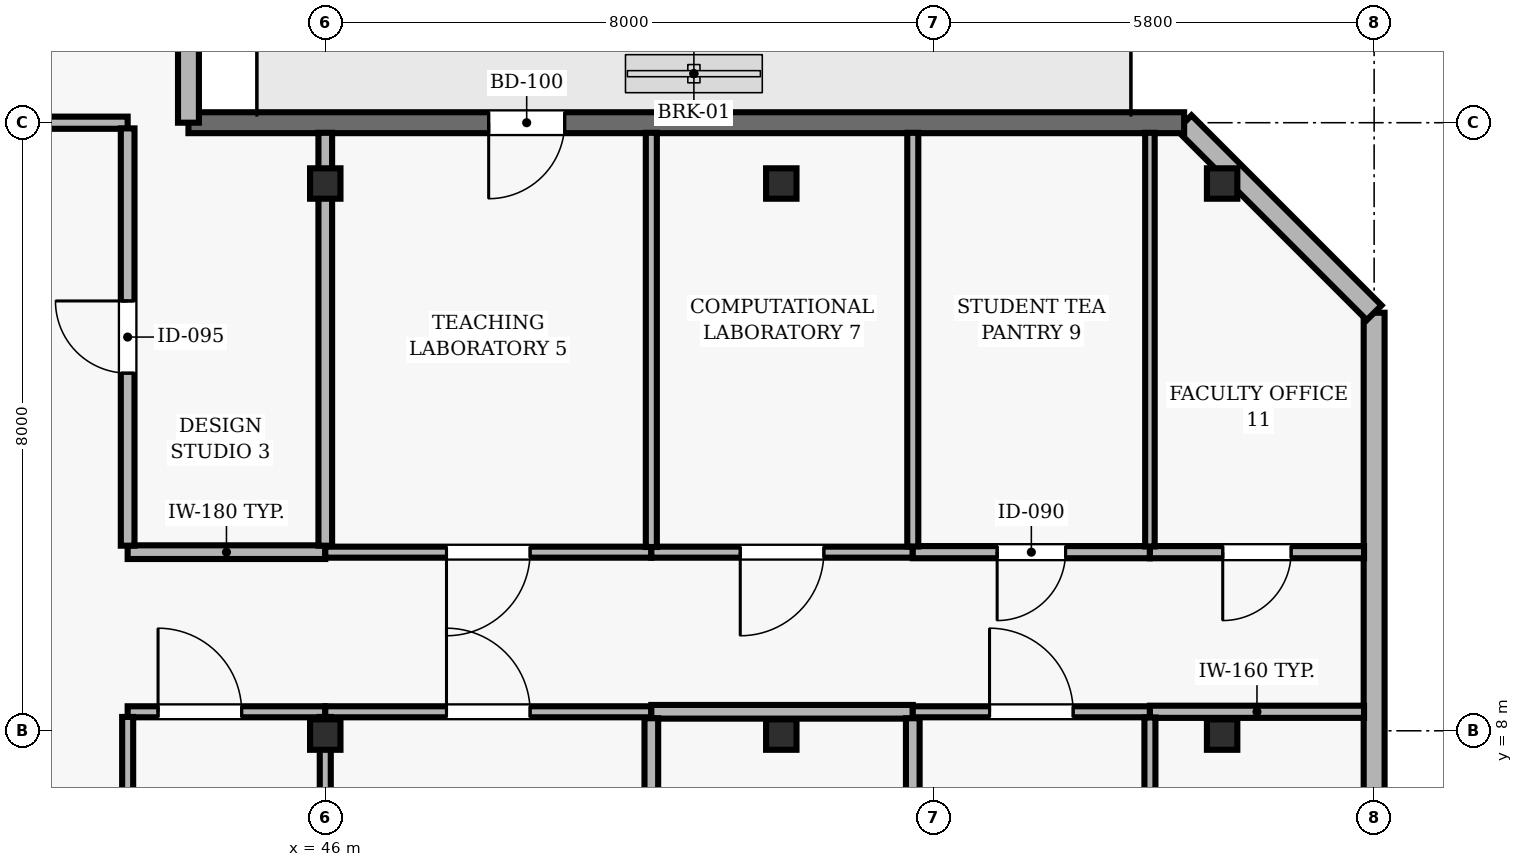
"""IFC4 building model, lengths in metres.
Left out: names, types, materials, properties, quantities, classifications, styles, units other than length and angle.
Written with IfcOpenShell. Run it as: python <this file> out.ifc"""

import sys

from ifc_helpers import new_model, si_unit, direction, frame, frame_2d, origin, origin_2d, place, context, subcontext, project, spatial, rectangle, hollow_rectangle, extrude, element, fill, save


model = new_model("IFC4")
c1 = context("Model", 3, precision=1e-05, world=origin(), true_north=direction((0.0, 1.0)))
c2 = subcontext(c1, "Body", "Model", "MODEL_VIEW")
j1 = project(units=[si_unit("LENGTHUNIT", "METRE"), si_unit("PLANEANGLEUNIT", "RADIAN")], contexts=[c1])
p1 = place(None, origin())
s1 = spatial("IfcSite", under=j1, at=p1, CompositionType="ELEMENT")
p2 = place(p1, origin())
s2 = spatial("IfcBuilding", under=s1, at=p2, CompositionType="ELEMENT")
p3 = place(p2, frame((0.0, 0.0, 283.3)))
s3 = spatial("IfcBuildingStorey", under=s2, at=p3, CompositionType="ELEMENT", Elevation=283.3)
for number, where, z_axis, x_axis in (
    (1, (46.0, 7.95, 0.0), (0.0, 0.0, 1.0), (1.0, 0.0, 0.0)),
    (2, (46.0, 15.2, 0.0), (0.0, 0.0, 1.0), (1.0, 0.0, 0.0)),
    (3, (52.0, 7.95, 0.0), (0.0, 0.0, 1.0), (1.0, 0.0, 0.0)),
    (4, (52.0, 15.2, 0.0), (0.0, 0.0, 1.0), (1.0, 0.0, 0.0)),
    (5, (57.8, 7.95, 0.0), (0.0, 0.0, 1.0), (1.0, 0.0, 0.0)),
    (6, (57.8, 15.2, 0.0), (0.0, 0.0, 1.0), (1.0, 0.0, 0.0)),
):
    element("IfcColumn", number, at=place(p3, frame(where, z_axis=z_axis, x_axis=x_axis)), inside=s3, PredefinedType="COLUMN", context=c2, shape_type="SweptSolid", body=[
        extrude(hollow_rectangle(XDim=0.4, YDim=0.4, WallThickness=0.02, at=origin_2d()), origin(), (0.0, 0.0, 1.0), 3.9),
    ])
p4 = place(p3, frame((59.8, 2.5, 0.0), z_axis=(0.0, 0.0, 1.0), x_axis=(0.0, 1.0, 0.0)))
e7 = element("IfcWall", 7, at=p4, inside=s3, PredefinedType="SOLIDWALL", context=c2, shape_type="SweptSolid", body=[
    extrude(rectangle(XDim=11.0, YDim=0.275, at=frame_2d((5.5, 0.0))), origin(), (0.0, 0.0, 1.0), 3.69),
])
p5 = place(p4, frame((1.25, 0.0, 0.9)))
e8 = element("IfcOpeningElement", 8, at=p5, cuts=e7, PredefinedType="OPENING", context=c2, shape_type="SweptSolid", body=[
    extrude(rectangle(XDim=3.0, YDim=2.2, at=frame_2d((1.5, 1.1))), frame((0.0, 0.147, 0.0), z_axis=(0.0, -1.0, 0.0), x_axis=(1.0, 0.0, 0.0)), (0.0, 0.0, 1.0), 0.295),
])
p6 = place(p3, frame((59.8, 13.5, 0.0), z_axis=(0.0, 0.0, 1.0), x_axis=(-0.707106781187, 0.707106781187, 0.0)))
e9 = element("IfcWall", 9, at=p6, inside=s3, PredefinedType="SOLIDWALL", context=c2, shape_type="SweptSolid", body=[
    extrude(rectangle(XDim=3.536, YDim=0.275, at=frame_2d((1.768, 0.0))), origin(), (0.0, 0.0, 1.0), 3.69),
])
p7 = place(p3, frame((57.3, 16.0, 0.0), z_axis=(0.0, 0.0, 1.0), x_axis=(-1.0, 0.0, 0.0)))
e10 = element("IfcWall", 10, at=p7, inside=s3, PredefinedType="SOLIDWALL", context=c2, shape_type="SweptSolid", body=[
    extrude(rectangle(XDim=13.1, YDim=0.275, at=frame_2d((6.55, 0.0))), origin(), (0.0, 0.0, 1.0), 3.69),
])
p8 = place(p7, frame((8.15, 0.0, 0.0)))
e11 = element("IfcOpeningElement", 11, at=p8, cuts=e10, PredefinedType="OPENING", context=c2, shape_type="SweptSolid", body=[
    extrude(rectangle(XDim=1.0, YDim=2.2, at=frame_2d((0.5, 1.1))), frame((0.0, 0.147, 0.0), z_axis=(0.0, -1.0, 0.0), x_axis=(1.0, 0.0, 0.0)), (0.0, 0.0, 1.0), 0.295),
])
p9 = place(p3, frame((44.2, 16.0, 0.0), z_axis=(0.0, 0.0, 1.0), x_axis=(0.0, 1.0, 0.0)))
e12 = element("IfcWall", 12, at=p9, inside=s3, PredefinedType="SOLIDWALL", context=c2, shape_type="SweptSolid", body=[
    extrude(rectangle(XDim=4.4, YDim=0.275, at=frame_2d((2.2, 0.0))), origin(), (0.0, 0.0, 1.0), 3.69),
])
p10 = place(p3, frame((43.4, 8.25, 0.0), z_axis=(0.0, 0.0, 1.0), x_axis=(1.0, 0.0, 0.0)))
e13 = element("IfcWall", 13, at=p10, inside=s3, PredefinedType="PARTITIONING", context=c2, shape_type="SweptSolid", body=[
    extrude(rectangle(XDim=2.6, YDim=0.145, at=frame_2d((1.3, 0.0))), origin(), (0.0, 0.0, 1.0), 3.227),
])
p11 = place(p10, frame((0.4, 0.0, 0.0)))
e14 = element("IfcOpeningElement", 14, at=p11, cuts=e13, PredefinedType="OPENING", context=c2, shape_type="SweptSolid", body=[
    extrude(rectangle(XDim=1.1, YDim=2.15, at=frame_2d((0.55, 1.075))), frame((0.0, 0.083, 0.0), z_axis=(0.0, -1.0, 0.0), x_axis=(1.0, 0.0, 0.0)), (0.0, 0.0, 1.0), 0.165),
])
p12 = place(p3, frame((43.4, 16.0, 0.0), z_axis=(0.0, 0.0, 1.0), x_axis=(-1.0, 0.0, 0.0)))
e15 = element("IfcWall", 15, at=p12, inside=s3, PredefinedType="PARTITIONING", context=c2, shape_type="SweptSolid", body=[
    extrude(rectangle(XDim=5.35, YDim=0.16, at=frame_2d((2.675, 0.0))), origin(), (0.0, 0.0, 1.0), 3.39),
])
p13 = place(p12, frame((2.225, 0.0, 0.0)))
e16 = element("IfcOpeningElement", 16, at=p13, cuts=e15, PredefinedType="OPENING", context=c2, shape_type="SweptSolid", body=[
    extrude(rectangle(XDim=0.9, YDim=2.1, at=frame_2d((0.45, 1.05))), frame((0.0, 0.09, 0.0), z_axis=(0.0, -1.0, 0.0), x_axis=(1.0, 0.0, 0.0)), (0.0, 0.0, 1.0), 0.18),
])
p14 = place(p3, frame((46.0, 8.25, 0.0), z_axis=(0.0, 0.0, 1.0), x_axis=(1.0, 0.0, 0.0)))
e17 = element("IfcWall", 17, at=p14, inside=s3, PredefinedType="PARTITIONING", context=c2, shape_type="SweptSolid", body=[
    extrude(rectangle(XDim=4.29, YDim=0.145, at=frame_2d((2.145, 0.0))), origin(), (0.0, 0.0, 1.0), 3.227),
])
p15 = place(p14, frame((1.595, 0.0, 0.0)))
e18 = element("IfcOpeningElement", 18, at=p15, cuts=e17, PredefinedType="OPENING", context=c2, shape_type="SweptSolid", body=[
    extrude(rectangle(XDim=1.1, YDim=2.15, at=frame_2d((0.55, 1.075))), frame((0.0, 0.083, 0.0), z_axis=(0.0, -1.0, 0.0), x_axis=(1.0, 0.0, 0.0)), (0.0, 0.0, 1.0), 0.165),
])
p16 = place(p3, frame((46.0, 10.35, 0.0), z_axis=(0.0, 0.0, 1.0), x_axis=(-1.0, 0.0, 0.0)))
e19 = element("IfcWall", 19, at=p16, inside=s3, PredefinedType="PARTITIONING", context=c2, shape_type="SweptSolid", body=[
    extrude(rectangle(XDim=2.6, YDim=0.18, at=frame_2d((1.3, 0.0))), origin(), (0.0, 0.0, 1.0), 3.424),
])
p17 = place(p3, frame((50.29, 8.25, 0.0), z_axis=(0.0, 0.0, 1.0), x_axis=(1.0, 0.0, 0.0)))
e20 = element("IfcWall", 20, at=p17, inside=s3, PredefinedType="PARTITIONING", context=c2, shape_type="SweptSolid", body=[
    extrude(rectangle(XDim=3.44, YDim=0.18, at=frame_2d((1.72, 0.0))), origin(), (0.0, 0.0, 1.0), 3.227),
])
p18 = place(p3, frame((50.29, 10.35, 0.0), z_axis=(0.0, 0.0, 1.0), x_axis=(-1.0, 0.0, 0.0)))
e21 = element("IfcWall", 21, at=p18, inside=s3, PredefinedType="PARTITIONING", context=c2, shape_type="SweptSolid", body=[
    extrude(rectangle(XDim=4.29, YDim=0.145, at=frame_2d((2.145, 0.0))), origin(), (0.0, 0.0, 1.0), 3.424),
])
p19 = place(p18, frame((1.595, 0.0, 0.0)))
e22 = element("IfcOpeningElement", 22, at=p19, cuts=e21, PredefinedType="OPENING", context=c2, shape_type="SweptSolid", body=[
    extrude(rectangle(XDim=1.1, YDim=2.15, at=frame_2d((0.55, 1.075))), frame((0.0, 0.083, 0.0), z_axis=(0.0, -1.0, 0.0), x_axis=(1.0, 0.0, 0.0)), (0.0, 0.0, 1.0), 0.165),
])
p20 = place(p3, frame((53.73, 8.25, 0.0), z_axis=(0.0, 0.0, 1.0), x_axis=(1.0, 0.0, 0.0)))
e23 = element("IfcWall", 23, at=p20, inside=s3, PredefinedType="PARTITIONING", context=c2, shape_type="SweptSolid", body=[
    extrude(rectangle(XDim=3.12, YDim=0.145, at=frame_2d((1.56, 0.0))), origin(), (0.0, 0.0, 1.0), 3.227),
])
p21 = place(p20, frame((1.01, 0.0, 0.0)))
e24 = element("IfcOpeningElement", 24, at=p21, cuts=e23, PredefinedType="OPENING", context=c2, shape_type="SweptSolid", body=[
    extrude(rectangle(XDim=1.1, YDim=2.15, at=frame_2d((0.55, 1.075))), frame((0.0, 0.083, 0.0), z_axis=(0.0, -1.0, 0.0), x_axis=(1.0, 0.0, 0.0)), (0.0, 0.0, 1.0), 0.165),
])
p22 = place(p3, frame((53.73, 10.35, 0.0), z_axis=(0.0, 0.0, 1.0), x_axis=(-1.0, 0.0, 0.0)))
e25 = element("IfcWall", 25, at=p22, inside=s3, PredefinedType="PARTITIONING", context=c2, shape_type="SweptSolid", body=[
    extrude(rectangle(XDim=3.44, YDim=0.145, at=frame_2d((1.72, 0.0))), origin(), (0.0, 0.0, 1.0), 3.424),
])
p23 = place(p22, frame((1.17, 0.0, 0.0)))
e26 = element("IfcOpeningElement", 26, at=p23, cuts=e25, PredefinedType="OPENING", context=c2, shape_type="SweptSolid", body=[
    extrude(rectangle(XDim=1.1, YDim=2.15, at=frame_2d((0.55, 1.075))), frame((0.0, 0.083, 0.0), z_axis=(0.0, -1.0, 0.0), x_axis=(1.0, 0.0, 0.0)), (0.0, 0.0, 1.0), 0.165),
])
p24 = place(p3, frame((56.85, 8.25, 0.0), z_axis=(0.0, 0.0, 1.0), x_axis=(1.0, 0.0, 0.0)))
e27 = element("IfcWall", 27, at=p24, inside=s3, PredefinedType="PARTITIONING", context=c2, shape_type="SweptSolid", body=[
    extrude(rectangle(XDim=2.817, YDim=0.16, at=frame_2d((1.408, 0.0))), origin(), (0.0, 0.0, 1.0), 3.227),
])
p25 = place(p3, frame((56.85, 10.35, 0.0), z_axis=(0.0, 0.0, 1.0), x_axis=(-1.0, 0.0, 0.0)))
e28 = element("IfcWall", 28, at=p25, inside=s3, PredefinedType="PARTITIONING", context=c2, shape_type="SweptSolid", body=[
    extrude(rectangle(XDim=3.12, YDim=0.16, at=frame_2d((1.56, 0.0))), origin(), (0.0, 0.0, 1.0), 3.424),
])
p26 = place(p25, frame((1.11, 0.0, 0.0)))
e29 = element("IfcOpeningElement", 29, at=p26, cuts=e28, PredefinedType="OPENING", context=c2, shape_type="SweptSolid", body=[
    extrude(rectangle(XDim=0.9, YDim=2.1, at=frame_2d((0.45, 1.05))), frame((0.0, 0.09, 0.0), z_axis=(0.0, -1.0, 0.0), x_axis=(1.0, 0.0, 0.0)), (0.0, 0.0, 1.0), 0.18),
])
p27 = place(p3, frame((59.667, 10.35, 0.0), z_axis=(0.0, 0.0, 1.0), x_axis=(-1.0, 0.0, 0.0)))
e30 = element("IfcWall", 30, at=p27, inside=s3, PredefinedType="PARTITIONING", context=c2, shape_type="SweptSolid", body=[
    extrude(rectangle(XDim=2.817, YDim=0.16, at=frame_2d((1.408, 0.0))), origin(), (0.0, 0.0, 1.0), 3.424),
])
p28 = place(p27, frame((0.959, 0.0, 0.0)))
e31 = element("IfcOpeningElement", 31, at=p28, cuts=e30, PredefinedType="OPENING", context=c2, shape_type="SweptSolid", body=[
    extrude(rectangle(XDim=0.9, YDim=2.1, at=frame_2d((0.45, 1.05))), frame((0.0, 0.09, 0.0), z_axis=(0.0, -1.0, 0.0), x_axis=(1.0, 0.0, 0.0)), (0.0, 0.0, 1.0), 0.18),
])
p29 = place(p3, frame((43.4, 7.117, 0.0), z_axis=(0.0, 0.0, 1.0), x_axis=(0.0, 1.0, 0.0)))
e32 = element("IfcWall", 32, at=p29, inside=s3, PredefinedType="PARTITIONING", context=c2, shape_type="SweptSolid", body=[
    extrude(rectangle(XDim=1.065, YDim=0.145, at=frame_2d((0.532, 0.0))), origin(), (0.0, 0.0, 1.0), 3.69),
])
p30 = place(p3, frame((43.4, 10.435, 0.0), z_axis=(0.0, 0.0, 1.0), x_axis=(0.0, 1.0, 0.0)))
e33 = element("IfcWall", 33, at=p30, inside=s3, PredefinedType="PARTITIONING", context=c2, shape_type="SweptSolid", body=[
    extrude(rectangle(XDim=5.49, YDim=0.18, at=frame_2d((2.745, 0.0))), origin(), (0.0, 0.0, 1.0), 3.69),
])
p31 = place(p30, frame((2.27, 0.0, 0.0)))
e34 = element("IfcOpeningElement", 34, at=p31, cuts=e33, PredefinedType="OPENING", context=c2, shape_type="SweptSolid", body=[
    extrude(rectangle(XDim=0.95, YDim=2.1, at=frame_2d((0.475, 1.05))), frame((0.0, 0.1, 0.0), z_axis=(0.0, -1.0, 0.0), x_axis=(1.0, 0.0, 0.0)), (0.0, 0.0, 1.0), 0.2),
])
p32 = place(p3, frame((46.0, 0.133, 0.0), z_axis=(0.0, 0.0, 1.0), x_axis=(0.0, 1.0, 0.0)))
e35 = element("IfcWall", 35, at=p32, inside=s3, PredefinedType="PARTITIONING", context=c2, shape_type="SweptSolid", body=[
    extrude(rectangle(XDim=8.049, YDim=0.145, at=frame_2d((4.024, 0.0))), origin(), (0.0, 0.0, 1.0), 3.227),
])
p33 = place(p3, frame((46.0, 10.435, 0.0), z_axis=(0.0, 0.0, 1.0), x_axis=(0.0, 1.0, 0.0)))
e36 = element("IfcWall", 36, at=p33, inside=s3, PredefinedType="PARTITIONING", context=c2, shape_type="SweptSolid", body=[
    extrude(rectangle(XDim=5.432, YDim=0.18, at=frame_2d((2.716, 0.0))), origin(), (0.0, 0.0, 1.0), 3.227),
])
p34 = place(p3, frame((50.29, 0.133, 0.0), z_axis=(0.0, 0.0, 1.0), x_axis=(0.0, 1.0, 0.0)))
e37 = element("IfcWall", 37, at=p34, inside=s3, PredefinedType="PARTITIONING", context=c2, shape_type="SweptSolid", body=[
    extrude(rectangle(XDim=8.032, YDim=0.18, at=frame_2d((4.016, 0.0))), origin(), (0.0, 0.0, 1.0), 3.69),
])
p35 = place(p34, frame((3.541, 0.0, 0.0)))
e38 = element("IfcOpeningElement", 38, at=p35, cuts=e37, PredefinedType="OPENING", context=c2, shape_type="SweptSolid", body=[
    extrude(rectangle(XDim=0.95, YDim=2.1, at=frame_2d((0.475, 1.05))), frame((0.0, 0.1, 0.0), z_axis=(0.0, -1.0, 0.0), x_axis=(1.0, 0.0, 0.0)), (0.0, 0.0, 1.0), 0.2),
])
p36 = place(p3, frame((50.29, 10.418, 0.0), z_axis=(0.0, 0.0, 1.0), x_axis=(0.0, 1.0, 0.0)))
e39 = element("IfcWall", 39, at=p36, inside=s3, PredefinedType="PARTITIONING", context=c2, shape_type="SweptSolid", body=[
    extrude(rectangle(XDim=5.449, YDim=0.145, at=frame_2d((2.725, 0.0))), origin(), (0.0, 0.0, 1.0), 3.69),
])
p37 = place(p3, frame((53.73, 0.133, 0.0), z_axis=(0.0, 0.0, 1.0), x_axis=(0.0, 1.0, 0.0)))
e40 = element("IfcWall", 40, at=p37, inside=s3, PredefinedType="PARTITIONING", context=c2, shape_type="SweptSolid", body=[
    extrude(rectangle(XDim=8.032, YDim=0.18, at=frame_2d((4.016, 0.0))), origin(), (0.0, 0.0, 1.0), 3.69),
])
p38 = place(p3, frame((53.73, 10.425, 0.0), z_axis=(0.0, 0.0, 1.0), x_axis=(0.0, 1.0, 0.0)))
e41 = element("IfcWall", 41, at=p38, inside=s3, PredefinedType="PARTITIONING", context=c2, shape_type="SweptSolid", body=[
    extrude(rectangle(XDim=5.442, YDim=0.145, at=frame_2d((2.721, 0.0))), origin(), (0.0, 0.0, 1.0), 3.69),
])
p39 = place(p3, frame((56.85, 0.133, 0.0), z_axis=(0.0, 0.0, 1.0), x_axis=(0.0, 1.0, 0.0)))
e42 = element("IfcWall", 42, at=p39, inside=s3, PredefinedType="PARTITIONING", context=c2, shape_type="SweptSolid", body=[
    extrude(rectangle(XDim=8.042, YDim=0.145, at=frame_2d((4.021, 0.0))), origin(), (0.0, 0.0, 1.0), 3.69),
])
p40 = place(p39, frame((3.571, 0.0, 0.0)))
e43 = element("IfcOpeningElement", 43, at=p40, cuts=e42, PredefinedType="OPENING", context=c2, shape_type="SweptSolid", body=[
    extrude(rectangle(XDim=0.9, YDim=2.1, at=frame_2d((0.45, 1.05))), frame((0.0, 0.083, 0.0), z_axis=(0.0, -1.0, 0.0), x_axis=(1.0, 0.0, 0.0)), (0.0, 0.0, 1.0), 0.165),
])
p41 = place(p3, frame((56.85, 10.425, 0.0), z_axis=(0.0, 0.0, 1.0), x_axis=(0.0, 1.0, 0.0)))
e44 = element("IfcWall", 44, at=p41, inside=s3, PredefinedType="PARTITIONING", context=c2, shape_type="SweptSolid", body=[
    extrude(rectangle(XDim=5.442, YDim=0.125, at=frame_2d((2.721, 0.0))), origin(), (0.0, 0.0, 1.0), 3.69),
])
p42 = place(p8, origin())
e45 = element("IfcDoor", 45, at=p42, inside=s3, OperationType="SINGLE_SWING_RIGHT", PredefinedType="DOOR", context=c2, shape_type="SweptSolid", body=[
    extrude(rectangle(XDim=1.0, YDim=2.2, at=frame_2d((0.5, 1.1))), frame((0.0, 0.025, 0.0), z_axis=(0.0, -1.0, 0.0), x_axis=(1.0, 0.0, 0.0)), (0.0, 0.0, 1.0), 0.05),
])
fill(e11, e45)
p43 = place(p11, origin())
e46 = element("IfcDoor", 46, at=p43, inside=s3, OperationType="SINGLE_SWING_LEFT", PredefinedType="DOOR", context=c2, shape_type="SweptSolid", body=[
    extrude(rectangle(XDim=1.1, YDim=2.15, at=frame_2d((0.55, 1.075))), frame((0.0, 0.025, 0.0), z_axis=(0.0, -1.0, 0.0), x_axis=(1.0, 0.0, 0.0)), (0.0, 0.0, 1.0), 0.05),
])
fill(e14, e46)
p44 = place(p31, origin())
e47 = element("IfcDoor", 47, at=p44, inside=s3, OperationType="SINGLE_SWING_RIGHT", PredefinedType="DOOR", context=c2, shape_type="SweptSolid", body=[
    extrude(rectangle(XDim=0.95, YDim=2.1, at=frame_2d((0.475, 1.05))), frame((0.0, 0.025, 0.0), z_axis=(0.0, -1.0, 0.0), x_axis=(1.0, 0.0, 0.0)), (0.0, 0.0, 1.0), 0.05),
])
fill(e34, e47)
p45 = place(p15, origin())
e48 = element("IfcDoor", 48, at=p45, inside=s3, OperationType="SINGLE_SWING_LEFT", PredefinedType="DOOR", context=c2, shape_type="SweptSolid", body=[
    extrude(rectangle(XDim=1.1, YDim=2.15, at=frame_2d((0.55, 1.075))), frame((0.0, 0.025, 0.0), z_axis=(0.0, -1.0, 0.0), x_axis=(1.0, 0.0, 0.0)), (0.0, 0.0, 1.0), 0.05),
])
fill(e18, e48)
p46 = place(p19, origin())
e49 = element("IfcDoor", 49, at=p46, inside=s3, OperationType="SINGLE_SWING_RIGHT", PredefinedType="DOOR", context=c2, shape_type="SweptSolid", body=[
    extrude(rectangle(XDim=1.1, YDim=2.15, at=frame_2d((0.55, 1.075))), frame((0.0, 0.025, 0.0), z_axis=(0.0, -1.0, 0.0), x_axis=(1.0, 0.0, 0.0)), (0.0, 0.0, 1.0), 0.05),
])
fill(e22, e49)
p47 = place(p23, origin())
e50 = element("IfcDoor", 50, at=p47, inside=s3, OperationType="SINGLE_SWING_RIGHT", PredefinedType="DOOR", context=c2, shape_type="SweptSolid", body=[
    extrude(rectangle(XDim=1.1, YDim=2.15, at=frame_2d((0.55, 1.075))), frame((0.0, 0.025, 0.0), z_axis=(0.0, -1.0, 0.0), x_axis=(1.0, 0.0, 0.0)), (0.0, 0.0, 1.0), 0.05),
])
fill(e26, e50)
p48 = place(p21, origin())
e51 = element("IfcDoor", 51, at=p48, inside=s3, OperationType="SINGLE_SWING_LEFT", PredefinedType="DOOR", context=c2, shape_type="SweptSolid", body=[
    extrude(rectangle(XDim=1.1, YDim=2.15, at=frame_2d((0.55, 1.075))), frame((0.0, 0.025, 0.0), z_axis=(0.0, -1.0, 0.0), x_axis=(1.0, 0.0, 0.0)), (0.0, 0.0, 1.0), 0.05),
])
fill(e24, e51)
p49 = place(p26, origin())
e52 = element("IfcDoor", 52, at=p49, inside=s3, OperationType="SINGLE_SWING_RIGHT", PredefinedType="DOOR", context=c2, shape_type="SweptSolid", body=[
    extrude(rectangle(XDim=0.9, YDim=2.1, at=frame_2d((0.45, 1.05))), frame((0.0, 0.025, 0.0), z_axis=(0.0, -1.0, 0.0), x_axis=(1.0, 0.0, 0.0)), (0.0, 0.0, 1.0), 0.05),
])
fill(e29, e52)
p50 = place(p28, origin())
e53 = element("IfcDoor", 53, at=p50, inside=s3, OperationType="SINGLE_SWING_RIGHT", PredefinedType="DOOR", context=c2, shape_type="SweptSolid", body=[
    extrude(rectangle(XDim=0.9, YDim=2.1, at=frame_2d((0.45, 1.05))), frame((0.0, 0.025, 0.0), z_axis=(0.0, -1.0, 0.0), x_axis=(1.0, 0.0, 0.0)), (0.0, 0.0, 1.0), 0.05),
])
fill(e31, e53)
save(model, sys.argv[1])
